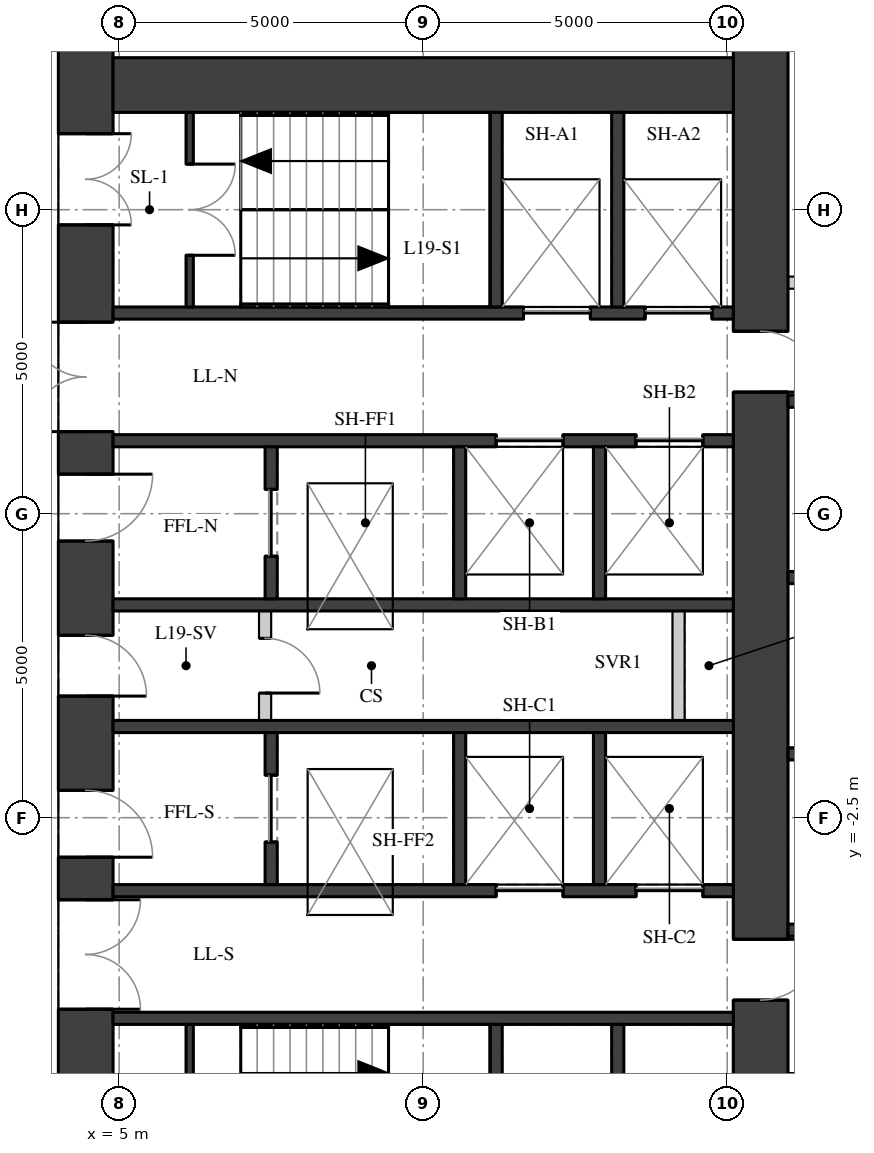
"""IFC4 building model, lengths in metres.
Left out: names, types, materials, properties, quantities, classifications, styles, units other than length and angle.
Written with IfcOpenShell. Run it as: python <this file> out.ifc"""

import sys

from ifc_helpers import new_model, si_unit, direction, frame, frame_2d, origin, place, context, subcontext, project, spatial, rectangle, extrude, element, fill, save


model = new_model("IFC4")
c1 = context("Model", 3, precision=1e-05, world=origin(), true_north=direction((0.0, 1.0)))
c2 = subcontext(c1, "Body", "Model", "MODEL_VIEW")
j1 = project(units=[si_unit("LENGTHUNIT", "METRE"), si_unit("PLANEANGLEUNIT", "RADIAN")], contexts=[c1])
p1 = place(None, origin())
s1 = spatial("IfcSite", under=j1, at=p1, CompositionType="ELEMENT")
p2 = place(p1, origin())
s2 = spatial("IfcBuilding", under=s1, at=p2, CompositionType="ELEMENT")
p3 = place(p2, frame((0.0, 0.0, 71.2)))
s3 = spatial("IfcBuildingStorey", under=s2, at=p3, CompositionType="ELEMENT", Elevation=71.2)
p4 = place(p3, frame((4.45, -11.1, 0.0), z_axis=(0.0, 0.0, 1.0), x_axis=(0.0, 1.0, 0.0)))
e1 = element("IfcWall", 1, at=p4, inside=s3, PredefinedType="SHEAR", context=c2, shape_type="SweptSolid", body=[
    extrude(rectangle(XDim=22.2, YDim=0.9, at=frame_2d((11.1, 0.0))), origin(), (0.0, 0.0, 1.0), 3.02),
])
p5 = place(p4, frame((2.35, 0.0, 0.0)))
e2 = element("IfcOpeningElement", 2, at=p5, cuts=e1, PredefinedType="OPENING", context=c2, shape_type="SweptSolid", body=[
    extrude(rectangle(XDim=1.5, YDim=2.1, at=frame_2d((0.75, 1.05))), frame((0.0, 0.46, 0.0), z_axis=(0.0, -1.0, 0.0), x_axis=(1.0, 0.0, 0.0)), (0.0, 0.0, 1.0), 0.92),
])
p6 = place(p4, frame((5.45, 0.0, 0.0)))
e3 = element("IfcOpeningElement", 3, at=p6, cuts=e1, PredefinedType="OPENING", context=c2, shape_type="SweptSolid", body=[
    extrude(rectangle(XDim=1.8, YDim=2.1, at=frame_2d((0.9, 1.05))), frame((0.0, 0.46, 0.0), z_axis=(0.0, -1.0, 0.0), x_axis=(1.0, 0.0, 0.0)), (0.0, 0.0, 1.0), 0.92),
])
p7 = place(p4, frame((7.95, 0.0, 0.0)))
e4 = element("IfcOpeningElement", 4, at=p7, cuts=e1, PredefinedType="OPENING", context=c2, shape_type="SweptSolid", body=[
    extrude(rectangle(XDim=1.1, YDim=2.1, at=frame_2d((0.55, 1.05))), frame((0.0, 0.46, 0.0), z_axis=(0.0, -1.0, 0.0), x_axis=(1.0, 0.0, 0.0)), (0.0, 0.0, 1.0), 0.92),
])
p8 = place(p4, frame((10.6, 0.0, 0.0)))
e5 = element("IfcOpeningElement", 5, at=p8, cuts=e1, PredefinedType="OPENING", context=c2, shape_type="SweptSolid", body=[
    extrude(rectangle(XDim=1.0, YDim=2.1, at=frame_2d((0.5, 1.05))), frame((0.0, 0.46, 0.0), z_axis=(0.0, -1.0, 0.0), x_axis=(1.0, 0.0, 0.0)), (0.0, 0.0, 1.0), 0.92),
])
p9 = place(p4, frame((13.15, 0.0, 0.0)))
e6 = element("IfcOpeningElement", 6, at=p9, cuts=e1, PredefinedType="OPENING", context=c2, shape_type="SweptSolid", body=[
    extrude(rectangle(XDim=1.1, YDim=2.1, at=frame_2d((0.55, 1.05))), frame((0.0, 0.46, 0.0), z_axis=(0.0, -1.0, 0.0), x_axis=(1.0, 0.0, 0.0)), (0.0, 0.0, 1.0), 0.92),
])
p10 = place(p4, frame((14.95, 0.0, 0.0)))
e7 = element("IfcOpeningElement", 7, at=p10, cuts=e1, PredefinedType="OPENING", context=c2, shape_type="SweptSolid", body=[
    extrude(rectangle(XDim=1.8, YDim=2.1, at=frame_2d((0.9, 1.05))), frame((0.0, 0.46, 0.0), z_axis=(0.0, -1.0, 0.0), x_axis=(1.0, 0.0, 0.0)), (0.0, 0.0, 1.0), 0.92),
])
p11 = place(p4, frame((18.35, 0.0, 0.0)))
e8 = element("IfcOpeningElement", 8, at=p11, cuts=e1, PredefinedType="OPENING", context=c2, shape_type="SweptSolid", body=[
    extrude(rectangle(XDim=1.5, YDim=2.1, at=frame_2d((0.75, 1.05))), frame((0.0, 0.46, 0.0), z_axis=(0.0, -1.0, 0.0), x_axis=(1.0, 0.0, 0.0)), (0.0, 0.0, 1.0), 0.92),
])
p12 = place(p3, frame((15.55, -11.1, 0.0), z_axis=(0.0, 0.0, 1.0), x_axis=(0.0, 1.0, 0.0)))
e9 = element("IfcWall", 9, at=p12, inside=s3, PredefinedType="SHEAR", context=c2, shape_type="SweptSolid", body=[
    extrude(rectangle(XDim=22.2, YDim=0.9, at=frame_2d((11.1, 0.0))), origin(), (0.0, 0.0, 1.0), 3.02),
])
p13 = place(p12, frame((15.6, 0.0, 0.0)))
e10 = element("IfcOpeningElement", 10, at=p13, cuts=e9, PredefinedType="OPENING", context=c2, shape_type="SweptSolid", body=[
    extrude(rectangle(XDim=1.0, YDim=2.1, at=frame_2d((0.5, 1.05))), frame((0.0, 0.46, 0.0), z_axis=(0.0, -1.0, 0.0), x_axis=(1.0, 0.0, 0.0)), (0.0, 0.0, 1.0), 0.92),
])
p14 = place(p12, frame((5.6, 0.0, 0.0)))
e11 = element("IfcOpeningElement", 11, at=p14, cuts=e9, PredefinedType="OPENING", context=c2, shape_type="SweptSolid", body=[
    extrude(rectangle(XDim=1.0, YDim=2.1, at=frame_2d((0.5, 1.05))), frame((0.0, 0.46, 0.0), z_axis=(0.0, -1.0, 0.0), x_axis=(1.0, 0.0, 0.0)), (0.0, 0.0, 1.0), 0.92),
])
p15 = place(p3, frame((4.9, 9.55, 0.0), z_axis=(0.0, 0.0, 1.0), x_axis=(1.0, 0.0, 0.0)))
e12 = element("IfcWall", 12, at=p15, inside=s3, PredefinedType="SHEAR", context=c2, shape_type="SweptSolid", body=[
    extrude(rectangle(XDim=10.2, YDim=0.9, at=frame_2d((5.1, 0.0))), origin(), (0.0, 0.0, 1.0), 3.02),
])
p16 = place(p3, frame((4.9, 5.8, 0.0), z_axis=(0.0, 0.0, 1.0), x_axis=(1.0, 0.0, 0.0)))
e13 = element("IfcWall", 13, at=p16, inside=s3, PredefinedType="SHEAR", context=c2, shape_type="SweptSolid", body=[
    extrude(rectangle(XDim=10.2, YDim=0.2, at=frame_2d((5.1, 0.0))), origin(), (0.0, 0.0, 1.0), 3.02),
])
p17 = place(p16, frame((6.75, 0.0, 0.0)))
e14 = element("IfcOpeningElement", 14, at=p17, cuts=e13, PredefinedType="OPENING", context=c2, shape_type="SweptSolid", body=[
    extrude(rectangle(XDim=1.1, YDim=2.1, at=frame_2d((0.55, 1.05))), frame((0.0, 0.11, 0.0), z_axis=(0.0, -1.0, 0.0), x_axis=(1.0, 0.0, 0.0)), (0.0, 0.0, 1.0), 0.22),
])
p18 = place(p16, frame((8.75, 0.0, 0.0)))
e15 = element("IfcOpeningElement", 15, at=p18, cuts=e13, PredefinedType="OPENING", context=c2, shape_type="SweptSolid", body=[
    extrude(rectangle(XDim=1.1, YDim=2.1, at=frame_2d((0.55, 1.05))), frame((0.0, 0.11, 0.0), z_axis=(0.0, -1.0, 0.0), x_axis=(1.0, 0.0, 0.0)), (0.0, 0.0, 1.0), 0.22),
])
p19 = place(p3, frame((4.9, 3.7, 0.0), z_axis=(0.0, 0.0, 1.0), x_axis=(1.0, 0.0, 0.0)))
e16 = element("IfcWall", 16, at=p19, inside=s3, PredefinedType="SHEAR", context=c2, shape_type="SweptSolid", body=[
    extrude(rectangle(XDim=10.2, YDim=0.2, at=frame_2d((5.1, 0.0))), origin(), (0.0, 0.0, 1.0), 3.02),
])
p20 = place(p19, frame((6.3, 0.0, 0.0)))
e17 = element("IfcOpeningElement", 17, at=p20, cuts=e16, PredefinedType="OPENING", context=c2, shape_type="SweptSolid", body=[
    extrude(rectangle(XDim=1.1, YDim=2.1, at=frame_2d((0.55, 1.05))), frame((0.0, 0.11, 0.0), z_axis=(0.0, -1.0, 0.0), x_axis=(1.0, 0.0, 0.0)), (0.0, 0.0, 1.0), 0.22),
])
p21 = place(p19, frame((8.6, 0.0, 0.0)))
e18 = element("IfcOpeningElement", 18, at=p21, cuts=e16, PredefinedType="OPENING", context=c2, shape_type="SweptSolid", body=[
    extrude(rectangle(XDim=1.1, YDim=2.1, at=frame_2d((0.55, 1.05))), frame((0.0, 0.11, 0.0), z_axis=(0.0, -1.0, 0.0), x_axis=(1.0, 0.0, 0.0)), (0.0, 0.0, 1.0), 0.22),
])
for number, where, z_axis, x_axis in (
    (19, (4.9, 1.0, 0.0), (0.0, 0.0, 1.0), (1.0, 0.0, 0.0)),
    (20, (4.9, -1.0, 0.0), (0.0, 0.0, 1.0), (1.0, 0.0, 0.0)),
):
    element("IfcWall", number, at=place(p3, frame(where, z_axis=z_axis, x_axis=x_axis)), inside=s3, PredefinedType="SHEAR", context=c2, shape_type="SweptSolid", body=[
        extrude(rectangle(XDim=10.2, YDim=0.2, at=frame_2d((5.1, 0.0))), origin(), (0.0, 0.0, 1.0), 3.02),
    ])
p22 = place(p3, frame((4.9, -3.7, 0.0), z_axis=(0.0, 0.0, 1.0), x_axis=(1.0, 0.0, 0.0)))
e21 = element("IfcWall", 21, at=p22, inside=s3, PredefinedType="SHEAR", context=c2, shape_type="SweptSolid", body=[
    extrude(rectangle(XDim=10.2, YDim=0.2, at=frame_2d((5.1, 0.0))), origin(), (0.0, 0.0, 1.0), 3.02),
])
p23 = place(p22, frame((6.3, 0.0, 0.0)))
e22 = element("IfcOpeningElement", 22, at=p23, cuts=e21, PredefinedType="OPENING", context=c2, shape_type="SweptSolid", body=[
    extrude(rectangle(XDim=1.1, YDim=2.1, at=frame_2d((0.55, 1.05))), frame((0.0, 0.11, 0.0), z_axis=(0.0, -1.0, 0.0), x_axis=(1.0, 0.0, 0.0)), (0.0, 0.0, 1.0), 0.22),
])
p24 = place(p22, frame((8.6, 0.0, 0.0)))
e23 = element("IfcOpeningElement", 23, at=p24, cuts=e21, PredefinedType="OPENING", context=c2, shape_type="SweptSolid", body=[
    extrude(rectangle(XDim=1.1, YDim=2.1, at=frame_2d((0.55, 1.05))), frame((0.0, 0.11, 0.0), z_axis=(0.0, -1.0, 0.0), x_axis=(1.0, 0.0, 0.0)), (0.0, 0.0, 1.0), 0.22),
])
p25 = place(p3, frame((4.9, -5.8, 0.0), z_axis=(0.0, 0.0, 1.0), x_axis=(1.0, 0.0, 0.0)))
e24 = element("IfcWall", 24, at=p25, inside=s3, PredefinedType="SHEAR", context=c2, shape_type="SweptSolid", body=[
    extrude(rectangle(XDim=10.2, YDim=0.2, at=frame_2d((5.1, 0.0))), origin(), (0.0, 0.0, 1.0), 3.02),
])
for number, where, z_axis, x_axis in (
    (25, (11.2, 5.9, 0.0), (0.0, 0.0, 1.0), (0.0, 1.0, 0.0)),
    (26, (11.2, -9.1, 0.0), (0.0, 0.0, 1.0), (0.0, 1.0, 0.0)),
    (27, (13.2, 5.9, 0.0), (0.0, 0.0, 1.0), (0.0, 1.0, 0.0)),
    (28, (13.2, -9.1, 0.0), (0.0, 0.0, 1.0), (0.0, 1.0, 0.0)),
):
    element("IfcWall", number, at=place(p3, frame(where, z_axis=z_axis, x_axis=x_axis)), inside=s3, PredefinedType="SHEAR", context=c2, shape_type="SweptSolid", body=[
        extrude(rectangle(XDim=3.2, YDim=0.2, at=frame_2d((1.6, 0.0))), origin(), (0.0, 0.0, 1.0), 3.02),
    ])
p26 = place(p3, frame((7.5, 1.1, 0.0), z_axis=(0.0, 0.0, 1.0), x_axis=(0.0, 1.0, 0.0)))
e29 = element("IfcWall", 29, at=p26, inside=s3, PredefinedType="SHEAR", context=c2, shape_type="SweptSolid", body=[
    extrude(rectangle(XDim=2.5, YDim=0.2, at=frame_2d((1.25, 0.0))), origin(), (0.0, 0.0, 1.0), 3.02),
])
p27 = place(p26, frame((0.7, 0.0, 0.0)))
e30 = element("IfcOpeningElement", 30, at=p27, cuts=e29, PredefinedType="OPENING", context=c2, shape_type="SweptSolid", body=[
    extrude(rectangle(XDim=1.1, YDim=2.1, at=frame_2d((0.55, 1.05))), frame((0.0, 0.11, 0.0), z_axis=(0.0, -1.0, 0.0), x_axis=(1.0, 0.0, 0.0)), (0.0, 0.0, 1.0), 0.22),
])
p28 = place(p3, frame((7.5, -3.6, 0.0), z_axis=(0.0, 0.0, 1.0), x_axis=(0.0, 1.0, 0.0)))
e31 = element("IfcWall", 31, at=p28, inside=s3, PredefinedType="SHEAR", context=c2, shape_type="SweptSolid", body=[
    extrude(rectangle(XDim=2.5, YDim=0.2, at=frame_2d((1.25, 0.0))), origin(), (0.0, 0.0, 1.0), 3.02),
])
p29 = place(p28, frame((0.7, 0.0, 0.0)))
e32 = element("IfcOpeningElement", 32, at=p29, cuts=e31, PredefinedType="OPENING", context=c2, shape_type="SweptSolid", body=[
    extrude(rectangle(XDim=1.1, YDim=2.1, at=frame_2d((0.55, 1.05))), frame((0.0, 0.11, 0.0), z_axis=(0.0, -1.0, 0.0), x_axis=(1.0, 0.0, 0.0)), (0.0, 0.0, 1.0), 0.22),
])
for number, where, z_axis, x_axis in (
    (33, (10.6, 1.1, 0.0), (0.0, 0.0, 1.0), (0.0, 1.0, 0.0)),
    (34, (10.6, -3.6, 0.0), (0.0, 0.0, 1.0), (0.0, 1.0, 0.0)),
    (35, (12.9, 1.1, 0.0), (0.0, 0.0, 1.0), (0.0, 1.0, 0.0)),
    (36, (12.9, -3.6, 0.0), (0.0, 0.0, 1.0), (0.0, 1.0, 0.0)),
):
    element("IfcWall", number, at=place(p3, frame(where, z_axis=z_axis, x_axis=x_axis)), inside=s3, PredefinedType="SHEAR", context=c2, shape_type="SweptSolid", body=[
        extrude(rectangle(XDim=2.5, YDim=0.2, at=frame_2d((1.25, 0.0))), origin(), (0.0, 0.0, 1.0), 3.02),
    ])
p30 = place(p3, frame((6.16, 5.9, 0.0), z_axis=(0.0, 0.0, 1.0), x_axis=(0.0, 1.0, 0.0)))
e37 = element("IfcWall", 37, at=p30, inside=s3, PredefinedType="SHEAR", context=c2, shape_type="SweptSolid", body=[
    extrude(rectangle(XDim=3.2, YDim=0.12, at=frame_2d((1.6, 0.0))), origin(), (0.0, 0.0, 1.0), 3.02),
])
p31 = place(p30, frame((0.85, 0.0, 0.0)))
e38 = element("IfcOpeningElement", 38, at=p31, cuts=e37, PredefinedType="OPENING", context=c2, shape_type="SweptSolid", body=[
    extrude(rectangle(XDim=1.5, YDim=2.1, at=frame_2d((0.75, 1.05))), frame((0.0, 0.07, 0.0), z_axis=(0.0, -1.0, 0.0), x_axis=(1.0, 0.0, 0.0)), (0.0, 0.0, 1.0), 0.14),
])
p32 = place(p3, frame((6.16, -9.1, 0.0), z_axis=(0.0, 0.0, 1.0), x_axis=(0.0, 1.0, 0.0)))
e39 = element("IfcWall", 39, at=p32, inside=s3, PredefinedType="SHEAR", context=c2, shape_type="SweptSolid", body=[
    extrude(rectangle(XDim=3.2, YDim=0.12, at=frame_2d((1.6, 0.0))), origin(), (0.0, 0.0, 1.0), 3.02),
])
p33 = place(p32, frame((0.85, 0.0, 0.0)))
e40 = element("IfcOpeningElement", 40, at=p33, cuts=e39, PredefinedType="OPENING", context=c2, shape_type="SweptSolid", body=[
    extrude(rectangle(XDim=1.5, YDim=2.1, at=frame_2d((0.75, 1.05))), frame((0.0, 0.07, 0.0), z_axis=(0.0, -1.0, 0.0), x_axis=(1.0, 0.0, 0.0)), (0.0, 0.0, 1.0), 0.14),
])
p34 = place(p3, frame((7.4, -0.9, 0.0), z_axis=(0.0, 0.0, 1.0), x_axis=(0.0, 1.0, 0.0)))
e41 = element("IfcWall", 41, at=p34, inside=s3, PredefinedType="PARTITIONING", context=c2, shape_type="SweptSolid", body=[
    extrude(rectangle(XDim=1.8, YDim=0.2, at=frame_2d((0.9, 0.0))), origin(), (0.0, 0.0, 1.0), 3.02),
])
p35 = place(p34, frame((0.45, 0.0, 0.0)))
e42 = element("IfcOpeningElement", 42, at=p35, cuts=e41, PredefinedType="OPENING", context=c2, shape_type="SweptSolid", body=[
    extrude(rectangle(XDim=0.9, YDim=2.1, at=frame_2d((0.45, 1.05))), frame((0.0, 0.11, 0.0), z_axis=(0.0, -1.0, 0.0), x_axis=(1.0, 0.0, 0.0)), (0.0, 0.0, 1.0), 0.22),
])
p36 = place(p3, frame((14.2, -0.9, 0.0), z_axis=(0.0, 0.0, 1.0), x_axis=(0.0, 1.0, 0.0)))
e43 = element("IfcWall", 43, at=p36, inside=s3, PredefinedType="PARTITIONING", context=c2, shape_type="SweptSolid", body=[
    extrude(rectangle(XDim=1.8, YDim=0.2, at=frame_2d((0.9, 0.0))), origin(), (0.0, 0.0, 1.0), 3.02),
])
for number, where, z_axis, x_axis in (
    (44, (16.0, -4.35, 0.0), (0.0, 0.0, 1.0), (1.0, 0.0, 0.0)),
    (45, (16.0, -1.45, 0.0), (0.0, 0.0, 1.0), (1.0, 0.0, 0.0)),
    (46, (16.0, 1.45, 0.0), (0.0, 0.0, 1.0), (1.0, 0.0, 0.0)),
    (47, (16.0, 4.35, 0.0), (0.0, 0.0, 1.0), (1.0, 0.0, 0.0)),
):
    element("IfcWall", number, at=place(p3, frame(where, z_axis=z_axis, x_axis=x_axis)), inside=s3, PredefinedType="SHEAR", context=c2, shape_type="SweptSolid", body=[
        extrude(rectangle(XDim=2.3, YDim=0.2, at=frame_2d((1.15, 0.0))), origin(), (0.0, 0.0, 1.0), 3.02),
    ])
p37 = place(p3, frame((16.0, 6.3, 0.0), z_axis=(0.0, 0.0, 1.0), x_axis=(1.0, 0.0, 0.0)))
e48 = element("IfcWall", 48, at=p37, inside=s3, PredefinedType="PARTITIONING", context=c2, shape_type="SweptSolid", body=[
    extrude(rectangle(XDim=2.3, YDim=0.2, at=frame_2d((1.15, 0.0))), origin(), (0.0, 0.0, 1.0), 3.02),
])
p38 = place(p37, frame((0.3, 0.0, 0.0)))
e49 = element("IfcOpeningElement", 49, at=p38, cuts=e48, PredefinedType="OPENING", context=c2, shape_type="SweptSolid", body=[
    extrude(rectangle(XDim=0.9, YDim=2.1, at=frame_2d((0.45, 1.05))), frame((0.0, 0.11, 0.0), z_axis=(0.0, -1.0, 0.0), x_axis=(1.0, 0.0, 0.0)), (0.0, 0.0, 1.0), 0.22),
])
p39 = place(p6, origin())
e50 = element("IfcDoor", 50, at=p39, inside=s3, OperationType="DOUBLE_DOOR_SINGLE_SWING", PredefinedType="DOOR", context=c2, shape_type="SweptSolid", body=[
    extrude(rectangle(XDim=1.8, YDim=2.1, at=frame_2d((0.9, 1.05))), frame((0.0, 0.025, 0.0), z_axis=(0.0, -1.0, 0.0), x_axis=(1.0, 0.0, 0.0)), (0.0, 0.0, 1.0), 0.05),
])
fill(e3, e50)
p40 = place(p7, origin())
e51 = element("IfcDoor", 51, at=p40, inside=s3, OperationType="SINGLE_SWING_RIGHT", PredefinedType="DOOR", context=c2, shape_type="SweptSolid", body=[
    extrude(rectangle(XDim=1.1, YDim=2.1, at=frame_2d((0.55, 1.05))), frame((0.0, 0.025, 0.0), z_axis=(0.0, -1.0, 0.0), x_axis=(1.0, 0.0, 0.0)), (0.0, 0.0, 1.0), 0.05),
])
fill(e4, e51)
p41 = place(p8, origin())
e52 = element("IfcDoor", 52, at=p41, inside=s3, OperationType="SINGLE_SWING_RIGHT", PredefinedType="DOOR", context=c2, shape_type="SweptSolid", body=[
    extrude(rectangle(XDim=1.0, YDim=2.1, at=frame_2d((0.5, 1.05))), frame((0.0, 0.025, 0.0), z_axis=(0.0, -1.0, 0.0), x_axis=(1.0, 0.0, 0.0)), (0.0, 0.0, 1.0), 0.05),
])
fill(e5, e52)
p42 = place(p9, origin())
e53 = element("IfcDoor", 53, at=p42, inside=s3, OperationType="SINGLE_SWING_LEFT", PredefinedType="DOOR", context=c2, shape_type="SweptSolid", body=[
    extrude(rectangle(XDim=1.1, YDim=2.1, at=frame_2d((0.55, 1.05))), frame((0.0, 0.025, 0.0), z_axis=(0.0, -1.0, 0.0), x_axis=(1.0, 0.0, 0.0)), (0.0, 0.0, 1.0), 0.05),
])
fill(e6, e53)
p43 = place(p10, origin())
e54 = element("IfcDoor", 54, at=p43, inside=s3, OperationType="DOUBLE_DOOR_SINGLE_SWING", PredefinedType="DOOR", context=c2, shape_type="SweptSolid", body=[
    extrude(rectangle(XDim=1.8, YDim=2.1, at=frame_2d((0.9, 1.05))), frame((0.0, 0.025, 0.0), z_axis=(0.0, -1.0, 0.0), x_axis=(1.0, 0.0, 0.0)), (0.0, 0.0, 1.0), 0.05),
])
fill(e7, e54)
p44 = place(p11, origin())
e55 = element("IfcDoor", 55, at=p44, inside=s3, OperationType="DOUBLE_DOOR_SINGLE_SWING", PredefinedType="DOOR", context=c2, shape_type="SweptSolid", body=[
    extrude(rectangle(XDim=1.5, YDim=2.1, at=frame_2d((0.75, 1.05))), frame((0.0, 0.025, 0.0), z_axis=(0.0, -1.0, 0.0), x_axis=(1.0, 0.0, 0.0)), (0.0, 0.0, 1.0), 0.05),
])
fill(e8, e55)
p45 = place(p31, origin())
e56 = element("IfcDoor", 56, at=p45, inside=s3, OperationType="DOUBLE_DOOR_SINGLE_SWING", PredefinedType="DOOR", context=c2, shape_type="SweptSolid", body=[
    extrude(rectangle(XDim=1.5, YDim=2.1, at=frame_2d((0.75, 1.05))), frame((0.0, 0.025, 0.0), z_axis=(0.0, -1.0, 0.0), x_axis=(1.0, 0.0, 0.0)), (0.0, 0.0, 1.0), 0.05),
])
fill(e38, e56)
p46 = place(p17, origin())
e57 = element("IfcDoor", 57, at=p46, inside=s3, OperationType="DOUBLE_DOOR_SLIDING", PredefinedType="DOOR", context=c2, shape_type="SweptSolid", body=[
    extrude(rectangle(XDim=1.1, YDim=2.1, at=frame_2d((0.55, 1.05))), frame((0.0, 0.025, 0.0), z_axis=(0.0, -1.0, 0.0), x_axis=(1.0, 0.0, 0.0)), (0.0, 0.0, 1.0), 0.05),
])
fill(e14, e57)
p47 = place(p18, origin())
e58 = element("IfcDoor", 58, at=p47, inside=s3, OperationType="DOUBLE_DOOR_SLIDING", PredefinedType="DOOR", context=c2, shape_type="SweptSolid", body=[
    extrude(rectangle(XDim=1.1, YDim=2.1, at=frame_2d((0.55, 1.05))), frame((0.0, 0.025, 0.0), z_axis=(0.0, -1.0, 0.0), x_axis=(1.0, 0.0, 0.0)), (0.0, 0.0, 1.0), 0.05),
])
fill(e15, e58)
p48 = place(p20, origin())
e59 = element("IfcDoor", 59, at=p48, inside=s3, OperationType="DOUBLE_DOOR_SLIDING", PredefinedType="DOOR", context=c2, shape_type="SweptSolid", body=[
    extrude(rectangle(XDim=1.1, YDim=2.1, at=frame_2d((0.55, 1.05))), frame((0.0, 0.025, 0.0), z_axis=(0.0, -1.0, 0.0), x_axis=(1.0, 0.0, 0.0)), (0.0, 0.0, 1.0), 0.05),
])
fill(e17, e59)
p49 = place(p21, origin())
e60 = element("IfcDoor", 60, at=p49, inside=s3, OperationType="DOUBLE_DOOR_SLIDING", PredefinedType="DOOR", context=c2, shape_type="SweptSolid", body=[
    extrude(rectangle(XDim=1.1, YDim=2.1, at=frame_2d((0.55, 1.05))), frame((0.0, 0.025, 0.0), z_axis=(0.0, -1.0, 0.0), x_axis=(1.0, 0.0, 0.0)), (0.0, 0.0, 1.0), 0.05),
])
fill(e18, e60)
p50 = place(p23, origin())
e61 = element("IfcDoor", 61, at=p50, inside=s3, OperationType="DOUBLE_DOOR_SLIDING", PredefinedType="DOOR", context=c2, shape_type="SweptSolid", body=[
    extrude(rectangle(XDim=1.1, YDim=2.1, at=frame_2d((0.55, 1.05))), frame((0.0, 0.025, 0.0), z_axis=(0.0, -1.0, 0.0), x_axis=(1.0, 0.0, 0.0)), (0.0, 0.0, 1.0), 0.05),
])
fill(e22, e61)
p51 = place(p24, origin())
e62 = element("IfcDoor", 62, at=p51, inside=s3, OperationType="DOUBLE_DOOR_SLIDING", PredefinedType="DOOR", context=c2, shape_type="SweptSolid", body=[
    extrude(rectangle(XDim=1.1, YDim=2.1, at=frame_2d((0.55, 1.05))), frame((0.0, 0.025, 0.0), z_axis=(0.0, -1.0, 0.0), x_axis=(1.0, 0.0, 0.0)), (0.0, 0.0, 1.0), 0.05),
])
fill(e23, e62)
p52 = place(p27, origin())
e63 = element("IfcDoor", 63, at=p52, inside=s3, OperationType="DOUBLE_DOOR_SLIDING", PredefinedType="DOOR", context=c2, shape_type="SweptSolid", body=[
    extrude(rectangle(XDim=1.1, YDim=2.1, at=frame_2d((0.55, 1.05))), frame((0.0, 0.025, 0.0), z_axis=(0.0, -1.0, 0.0), x_axis=(1.0, 0.0, 0.0)), (0.0, 0.0, 1.0), 0.05),
])
fill(e30, e63)
p53 = place(p29, origin())
e64 = element("IfcDoor", 64, at=p53, inside=s3, OperationType="DOUBLE_DOOR_SLIDING", PredefinedType="DOOR", context=c2, shape_type="SweptSolid", body=[
    extrude(rectangle(XDim=1.1, YDim=2.1, at=frame_2d((0.55, 1.05))), frame((0.0, 0.025, 0.0), z_axis=(0.0, -1.0, 0.0), x_axis=(1.0, 0.0, 0.0)), (0.0, 0.0, 1.0), 0.05),
])
fill(e32, e64)
p54 = place(p35, origin())
e65 = element("IfcDoor", 65, at=p54, inside=s3, OperationType="SINGLE_SWING_RIGHT", PredefinedType="DOOR", context=c2, shape_type="SweptSolid", body=[
    extrude(rectangle(XDim=0.9, YDim=2.1, at=frame_2d((0.45, 1.05))), frame((0.0, 0.025, 0.0), z_axis=(0.0, -1.0, 0.0), x_axis=(1.0, 0.0, 0.0)), (0.0, 0.0, 1.0), 0.05),
])
fill(e42, e65)
p55 = place(p13, origin())
e66 = element("IfcDoor", 66, at=p55, inside=s3, OperationType="SINGLE_SWING_RIGHT", PredefinedType="DOOR", context=c2, shape_type="SweptSolid", body=[
    extrude(rectangle(XDim=1.0, YDim=2.1, at=frame_2d((0.5, 1.05))), frame((0.0, 0.025, 0.0), z_axis=(0.0, -1.0, 0.0), x_axis=(1.0, 0.0, 0.0)), (0.0, 0.0, 1.0), 0.05),
])
fill(e10, e66)
p56 = place(p14, origin())
e67 = element("IfcDoor", 67, at=p56, inside=s3, OperationType="SINGLE_SWING_LEFT", PredefinedType="DOOR", context=c2, shape_type="SweptSolid", body=[
    extrude(rectangle(XDim=1.0, YDim=2.1, at=frame_2d((0.5, 1.05))), frame((0.0, 0.025, 0.0), z_axis=(0.0, -1.0, 0.0), x_axis=(1.0, 0.0, 0.0)), (0.0, 0.0, 1.0), 0.05),
])
fill(e11, e67)
save(model, sys.argv[1])
